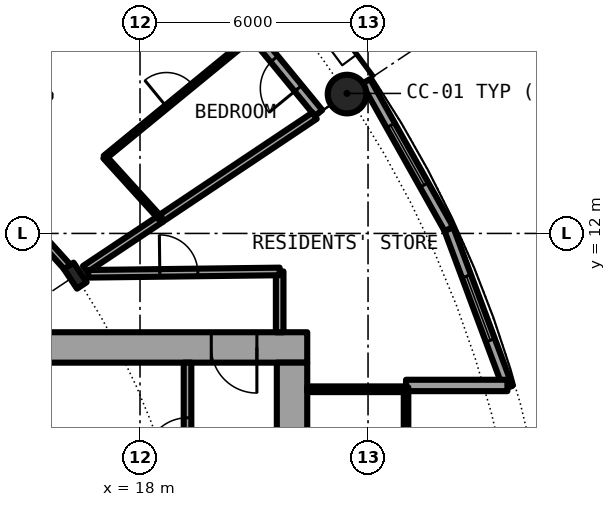
"""IFC4 building model, lengths in metres.
Left out: names, types, materials, properties, quantities, classifications, styles, units other than length and angle.
Written with IfcOpenShell. Run it as: python <this file> out.ifc"""

import sys

from ifc_helpers import new_model, si_unit, direction, frame, frame_2d, origin, origin_2d, place, context, subcontext, project, spatial, rectangle, hollow_circle, i_section, extrude, element, fill, save


model = new_model("IFC4")
c1 = context("Model", 3, precision=1e-05, world=origin(), true_north=direction((0.0, 1.0)))
c2 = subcontext(c1, "Body", "Model", "MODEL_VIEW")
j1 = project(units=[si_unit("LENGTHUNIT", "METRE"), si_unit("PLANEANGLEUNIT", "RADIAN")], contexts=[c1])
p1 = place(None, origin())
s1 = spatial("IfcSite", under=j1, at=p1, CompositionType="ELEMENT")
p2 = place(p1, origin())
s2 = spatial("IfcBuilding", under=s1, at=p2, CompositionType="ELEMENT")
p3 = place(p2, frame((0.0, 0.0, 31.95)))
s3 = spatial("IfcBuildingStorey", under=s2, at=p3, CompositionType="ELEMENT", Elevation=31.95)
p4 = place(p3, frame((23.448, 15.667, 0.0), z_axis=(0.0, 0.0, 1.0), x_axis=(1.0, 0.0, 0.0)))
e1 = element("IfcColumn", 1, at=p4, inside=s3, PredefinedType="COLUMN", context=c2, shape_type="SweptSolid", body=[
    extrude(hollow_circle(Radius=0.508, WallThickness=0.05, at=origin_2d()), origin(), (0.0, 0.0, 1.0), 3.05),
])
p5 = place(p3, frame((16.297, 10.889, 0.0), z_axis=(0.0, 0.0, 1.0), x_axis=(0.831469612303, 0.55557023302, 0.0)))
e2 = element("IfcColumn", 2, at=p5, inside=s3, PredefinedType="COLUMN", context=c2, shape_type="SweptSolid", body=[
    extrude(i_section(OverallWidth=0.305, OverallDepth=0.62, WebThickness=0.021, FlangeThickness=0.04, FilletRadius=0.027, at=origin_2d()), origin(), (0.0, 0.0, 1.0), 3.05),
])
p6 = place(p3, frame((22.699, 15.167, 0.0), z_axis=(0.0, 0.0, 1.0), x_axis=(-0.634382322723, 0.773019449054, 0.0)))
e3 = element("IfcWall", 3, at=p6, inside=s3, PredefinedType="SOLIDWALL", context=c2, shape_type="SweptSolid", body=[
    extrude(rectangle(XDim=5.352, YDim=0.25, at=frame_2d((2.676, 0.0))), origin(), (0.0, 0.0, 1.0), 2.7),
])
p7 = place(p6, frame((0.841, 0.0, 0.0)))
e4 = element("IfcOpeningElement", 4, at=p7, cuts=e3, PredefinedType="OPENING", context=c2, shape_type="SweptSolid", body=[
    extrude(rectangle(XDim=1.0, YDim=2.2, at=frame_2d((0.5, 1.1))), frame((0.0, 0.135, 0.0), z_axis=(0.0, -1.0, 0.0), x_axis=(1.0, 0.0, 0.0)), (0.0, 0.0, 1.0), 0.27),
])
p8 = place(p6, frame((3.111, 0.0, 0.3)))
e5 = element("IfcOpeningElement", 5, at=p8, cuts=e3, PredefinedType="OPENING", context=c2, shape_type="SweptSolid", body=[
    extrude(rectangle(XDim=1.8, YDim=2.1, at=frame_2d((0.9, 1.05))), frame((0.0, 0.135, 0.0), z_axis=(0.0, -1.0, 0.0), x_axis=(1.0, 0.0, 0.0)), (0.0, 0.0, 1.0), 0.27),
])
p9 = place(p3, frame((27.682, 7.945, 0.0), z_axis=(0.0, 0.0, 1.0), x_axis=(-0.349247811493, 0.937030397675, 0.0)))
e6 = element("IfcWall", 6, at=p9, inside=s3, PredefinedType="SOLIDWALL", context=c2, shape_type="SweptSolid", body=[
    extrude(rectangle(XDim=4.452, YDim=0.25, at=frame_2d((2.226, 0.0))), origin(), (0.0, 0.0, 1.0), 2.7),
])
p10 = place(p9, frame((1.327, 0.0, 0.3)))
e7 = element("IfcOpeningElement", 7, at=p10, cuts=e6, PredefinedType="OPENING", context=c2, shape_type="SweptSolid", body=[
    extrude(rectangle(XDim=1.8, YDim=2.1, at=frame_2d((0.9, 1.05))), frame((0.0, 0.135, 0.0), z_axis=(0.0, -1.0, 0.0), x_axis=(1.0, 0.0, 0.0)), (0.0, 0.0, 1.0), 0.27),
])
p11 = place(p3, frame((26.127, 12.117, 0.0), z_axis=(0.0, 0.0, 1.0), x_axis=(-0.489696356642, 0.871893042919, 0.0)))
e8 = element("IfcWall", 8, at=p11, inside=s3, PredefinedType="SOLIDWALL", context=c2, shape_type="SweptSolid", body=[
    extrude(rectangle(XDim=4.454, YDim=0.25, at=frame_2d((2.227, 0.0))), origin(), (0.0, 0.0, 1.0), 2.7),
])
p12 = place(p11, frame((1.327, 0.0, 0.3)))
e9 = element("IfcOpeningElement", 9, at=p12, cuts=e8, PredefinedType="OPENING", context=c2, shape_type="SweptSolid", body=[
    extrude(rectangle(XDim=1.8, YDim=2.1, at=frame_2d((0.9, 1.05))), frame((0.0, 0.135, 0.0), z_axis=(0.0, -1.0, 0.0), x_axis=(1.0, 0.0, 0.0)), (0.0, 0.0, 1.0), 0.27),
])
p13 = place(p3, frame((25.0, 8.0, 0.0), z_axis=(0.0, 0.0, 1.0), x_axis=(1.0, 0.0, 0.0)))
e10 = element("IfcWall", 10, at=p13, inside=s3, PredefinedType="SOLIDWALL", context=c2, shape_type="SweptSolid", body=[
    extrude(rectangle(XDim=2.667, YDim=0.3, at=frame_2d((1.333, 0.0))), origin(), (0.0, 0.0, 1.0), 2.7),
])
p14 = place(p3, frame((22.4, 9.0, 0.0), z_axis=(0.0, 0.0, 1.0), x_axis=(-1.0, 0.0, 0.0)))
e11 = element("IfcWall", 11, at=p14, inside=s3, PredefinedType="SHEAR", context=c2, shape_type="SweptSolid", body=[
    extrude(rectangle(XDim=14.2, YDim=0.8, at=frame_2d((7.1, 0.0))), origin(), (0.0, 0.0, 1.0), 3.05),
])
p15 = place(p14, frame((1.325, 0.0, 0.0)))
e12 = element("IfcOpeningElement", 12, at=p15, cuts=e11, PredefinedType="OPENING", context=c2, shape_type="SweptSolid", body=[
    extrude(rectangle(XDim=1.2, YDim=2.3, at=frame_2d((0.6, 1.15))), frame((0.0, 0.41, 0.0), z_axis=(0.0, -1.0, 0.0), x_axis=(1.0, 0.0, 0.0)), (0.0, 0.0, 1.0), 0.82),
])
p16 = place(p3, frame((22.0, 8.6, 0.0), z_axis=(0.0, 0.0, 1.0), x_axis=(0.0, -1.0, 0.0)))
e13 = element("IfcWall", 13, at=p16, inside=s3, PredefinedType="SHEAR", context=c2, shape_type="SweptSolid", body=[
    extrude(rectangle(XDim=17.2, YDim=0.8, at=frame_2d((8.6, 0.0))), origin(), (0.0, 0.0, 1.0), 3.05),
])
p17 = place(p16, frame((7.7, 0.0, 0.0)))
e14 = element("IfcOpeningElement", 14, at=p17, cuts=e13, PredefinedType="OPENING", context=c2, shape_type="SweptSolid", body=[
    extrude(rectangle(XDim=1.8, YDim=2.3, at=frame_2d((0.9, 1.15))), frame((0.0, 0.41, 0.0), z_axis=(0.0, -1.0, 0.0), x_axis=(1.0, 0.0, 0.0)), (0.0, 0.0, 1.0), 0.82),
])
p18 = place(p3, frame((19.25, 1.575, 0.0), z_axis=(0.0, 0.0, 1.0), x_axis=(0.0, 1.0, 0.0)))
e15 = element("IfcWall", 15, at=p18, inside=s3, PredefinedType="SOLIDWALL", context=c2, shape_type="SweptSolid", body=[
    extrude(rectangle(XDim=7.025, YDim=0.2, at=frame_2d((3.513, 0.0))), origin(), (0.0, 0.0, 1.0), 2.7),
])
p19 = place(p18, frame((4.475, 0.0, 0.0)))
e16 = element("IfcOpeningElement", 16, at=p19, cuts=e15, PredefinedType="OPENING", context=c2, shape_type="SweptSolid", body=[
    extrude(rectangle(XDim=1.1, YDim=2.3, at=frame_2d((0.55, 1.15))), frame((0.0, 0.11, 0.0), z_axis=(0.0, -1.0, 0.0), x_axis=(1.0, 0.0, 0.0)), (0.0, 0.0, 1.0), 0.22),
])
p20 = place(p3, frame((22.4, 7.9, 0.0), z_axis=(0.0, 0.0, 1.0), x_axis=(1.0, 0.0, 0.0)))
e17 = element("IfcWall", 17, at=p20, inside=s3, PredefinedType="PARTITIONING", context=c2, shape_type="SweptSolid", body=[
    extrude(rectangle(XDim=2.54, YDim=0.15, at=frame_2d((1.27, 0.0))), origin(), (0.0, 0.0, 1.0), 2.7),
])
p21 = place(p3, frame((25.0, -7.95, 0.0), z_axis=(0.0, 0.0, 1.0), x_axis=(0.0, 1.0, 0.0)))
e18 = element("IfcWall", 18, at=p21, inside=s3, PredefinedType="PARTITIONING", context=c2, shape_type="SweptSolid", body=[
    extrude(rectangle(XDim=15.9, YDim=0.12, at=frame_2d((7.95, 0.0))), origin(), (0.0, 0.0, 1.0), 2.7),
])
p22 = place(p21, frame((0.95, 0.0, 0.1)))
e19 = element("IfcOpeningElement", 19, at=p22, cuts=e18, PredefinedType="OPENING", context=c2, shape_type="SweptSolid", body=[
    extrude(rectangle(XDim=14.0, YDim=2.35, at=frame_2d((7.0, 1.175))), frame((0.0, 0.07, 0.0), z_axis=(0.0, -1.0, 0.0), x_axis=(1.0, 0.0, 0.0)), (0.0, 0.0, 1.0), 0.14),
])
p23 = place(p3, frame((21.675, 9.4, 0.0), z_axis=(0.0, 0.0, 1.0), x_axis=(0.0, 1.0, 0.0)))
e20 = element("IfcWall", 20, at=p23, inside=s3, PredefinedType="PARTITIONING", context=c2, shape_type="SweptSolid", body=[
    extrude(rectangle(XDim=1.6, YDim=0.2, at=frame_2d((0.8, 0.0))), origin(), (0.0, 0.0, 1.0), 2.7),
])
p24 = place(p3, frame((12.434, 15.151, 0.0), z_axis=(0.0, 0.0, 1.0), x_axis=(0.634381303318, 0.773020285633, 0.0)))
e21 = element("IfcWall", 21, at=p24, inside=s3, PredefinedType="PARTITIONING", context=c2, shape_type="SweptSolid", body=[
    extrude(rectangle(XDim=7.576, YDim=0.2, at=frame_2d((3.788, 0.0))), origin(), (0.0, 0.0, 1.0), 2.7),
])
p25 = place(p3, frame((17.077, 14.006, 0.0), z_axis=(0.0, 0.0, 1.0), x_axis=(0.77326214499, 0.634086472908, 0.0)))
e22 = element("IfcWall", 22, at=p25, inside=s3, PredefinedType="PARTITIONING", context=c2, shape_type="SweptSolid", body=[
    extrude(rectangle(XDim=5.089, YDim=0.1, at=frame_2d((2.544, 0.0))), origin(), (0.0, 0.0, 1.0), 2.7),
])
p26 = place(p25, frame((2.094, 0.0, 0.0)))
e23 = element("IfcOpeningElement", 23, at=p26, cuts=e22, PredefinedType="OPENING", context=c2, shape_type="SweptSolid", body=[
    extrude(rectangle(XDim=0.9, YDim=2.3, at=frame_2d((0.45, 1.15))), frame((0.0, 0.06, 0.0), z_axis=(0.0, -1.0, 0.0), x_axis=(1.0, 0.0, 0.0)), (0.0, 0.0, 1.0), 0.12),
])
p27 = place(p3, frame((18.542, 12.389, 0.0), z_axis=(0.0, 0.0, 1.0), x_axis=(0.831387096605, 0.55569370664, 0.0)))
e24 = element("IfcWall", 24, at=p27, inside=s3, PredefinedType="PARTITIONING", context=c2, shape_type="SweptSolid", body=[
    extrude(rectangle(XDim=4.875, YDim=0.2, at=frame_2d((2.438, 0.0))), origin(), (0.0, 0.0, 1.0), 2.7),
])
p28 = place(p3, frame((16.555, 11.061, 0.0), z_axis=(0.0, 0.0, 1.0), x_axis=(0.832066006555, 0.554676627176, 0.0)))
e25 = element("IfcWall", 25, at=p28, inside=s3, PredefinedType="PARTITIONING", context=c2, shape_type="SweptSolid", body=[
    extrude(rectangle(XDim=2.39, YDim=0.2, at=frame_2d((1.195, 0.0))), origin(), (0.0, 0.0, 1.0), 2.7),
])
p29 = place(p3, frame((16.637, 10.938, 0.0), z_axis=(0.0, 0.0, 1.0), x_axis=(0.99992425795, 0.012307654658, 0.0)))
e26 = element("IfcWall", 26, at=p29, inside=s3, PredefinedType="PARTITIONING", context=c2, shape_type="SweptSolid", body=[
    extrude(rectangle(XDim=5.039, YDim=0.2, at=frame_2d((2.519, 0.0))), origin(), (0.0, 0.0, 1.0), 2.7),
])
p30 = place(p29, frame((1.884, 0.0, 0.0)))
e27 = element("IfcOpeningElement", 27, at=p30, cuts=e26, PredefinedType="OPENING", context=c2, shape_type="SweptSolid", body=[
    extrude(rectangle(XDim=1.0, YDim=2.3, at=frame_2d((0.5, 1.15))), frame((0.0, 0.11, 0.0), z_axis=(0.0, -1.0, 0.0), x_axis=(1.0, 0.0, 0.0)), (0.0, 0.0, 1.0), 0.22),
])
p31 = place(p3, frame((12.434, 15.151, 0.0), z_axis=(0.0, 0.0, 1.0), x_axis=(0.671514934772, -0.740991020444, 0.0)))
e28 = element("IfcWall", 28, at=p31, inside=s3, PredefinedType="PARTITIONING", context=c2, shape_type="SweptSolid", body=[
    extrude(rectangle(XDim=5.598, YDim=0.2, at=frame_2d((2.799, 0.0))), origin(), (0.0, 0.0, 1.0), 2.38),
])
p32 = place(p31, frame((3.305, 0.0, 0.0)))
e29 = element("IfcOpeningElement", 29, at=p32, cuts=e28, PredefinedType="OPENING", context=c2, shape_type="SweptSolid", body=[
    extrude(rectangle(XDim=1.0, YDim=2.3, at=frame_2d((0.5, 1.15))), frame((0.0, 0.11, 0.0), z_axis=(0.0, -1.0, 0.0), x_axis=(1.0, 0.0, 0.0)), (0.0, 0.0, 1.0), 0.22),
])
p33 = place(p3, frame((17.072, 14.011, 0.0), z_axis=(0.0, 0.0, 1.0), x_axis=(0.67169789574, -0.740825172937, 0.0)))
e30 = element("IfcWall", 30, at=p33, inside=s3, PredefinedType="PARTITIONING", context=c2, shape_type="SweptSolid", body=[
    extrude(rectangle(XDim=2.183, YDim=0.1, at=frame_2d((1.091, 0.0))), origin(), (0.0, 0.0, 1.0), 2.7),
])
p34 = place(p7, origin())
e31 = element("IfcDoor", 31, at=p34, inside=s3, OperationType="SINGLE_SWING_LEFT", PredefinedType="DOOR", context=c2, shape_type="SweptSolid", body=[
    extrude(rectangle(XDim=1.0, YDim=2.2, at=frame_2d((0.5, 1.1))), frame((0.0, 0.025, 0.0), z_axis=(0.0, -1.0, 0.0), x_axis=(1.0, 0.0, 0.0)), (0.0, 0.0, 1.0), 0.05),
])
fill(e4, e31)
p35 = place(p10, origin())
e32 = element("IfcWindow", 32, at=p35, inside=s3, PartitioningType="SINGLE_PANEL", PredefinedType="WINDOW", context=c2, shape_type="SweptSolid", body=[
    extrude(rectangle(XDim=1.8, YDim=2.1, at=frame_2d((0.9, 1.05))), frame((0.0, 0.03, 0.0), z_axis=(0.0, -1.0, 0.0), x_axis=(1.0, 0.0, 0.0)), (0.0, 0.0, 1.0), 0.06),
])
fill(e7, e32)
p36 = place(p12, origin())
e33 = element("IfcWindow", 33, at=p36, inside=s3, PartitioningType="SINGLE_PANEL", PredefinedType="WINDOW", context=c2, shape_type="SweptSolid", body=[
    extrude(rectangle(XDim=1.8, YDim=2.1, at=frame_2d((0.9, 1.05))), frame((0.0, 0.03, 0.0), z_axis=(0.0, -1.0, 0.0), x_axis=(1.0, 0.0, 0.0)), (0.0, 0.0, 1.0), 0.06),
])
fill(e9, e33)
p37 = place(p19, origin())
e34 = element("IfcDoor", 34, at=p37, inside=s3, OperationType="SINGLE_SWING_LEFT", PredefinedType="DOOR", context=c2, shape_type="SweptSolid", body=[
    extrude(rectangle(XDim=1.1, YDim=2.3, at=frame_2d((0.55, 1.15))), frame((0.0, 0.025, 0.0), z_axis=(0.0, -1.0, 0.0), x_axis=(1.0, 0.0, 0.0)), (0.0, 0.0, 1.0), 0.05),
])
fill(e16, e34)
p38 = place(p15, origin())
e35 = element("IfcDoor", 35, at=p38, inside=s3, OperationType="SINGLE_SWING_RIGHT", PredefinedType="DOOR", context=c2, shape_type="SweptSolid", body=[
    extrude(rectangle(XDim=1.2, YDim=2.3, at=frame_2d((0.6, 1.15))), frame((0.0, 0.025, 0.0), z_axis=(0.0, -1.0, 0.0), x_axis=(1.0, 0.0, 0.0)), (0.0, 0.0, 1.0), 0.05),
])
fill(e12, e35)
p39 = place(p22, origin())
e36 = element("IfcWindow", 36, at=p39, inside=s3, PartitioningType="SINGLE_PANEL", PredefinedType="WINDOW", context=c2, shape_type="SweptSolid", body=[
    extrude(rectangle(XDim=14.0, YDim=2.35, at=frame_2d((7.0, 1.175))), frame((0.0, 0.03, 0.0), z_axis=(0.0, -1.0, 0.0), x_axis=(1.0, 0.0, 0.0)), (0.0, 0.0, 1.0), 0.06),
])
fill(e19, e36)
p40 = place(p26, origin())
e37 = element("IfcDoor", 37, at=p40, inside=s3, OperationType="SINGLE_SWING_RIGHT", PredefinedType="DOOR", context=c2, shape_type="SweptSolid", body=[
    extrude(rectangle(XDim=0.9, YDim=2.3, at=frame_2d((0.45, 1.15))), frame((0.0, 0.025, 0.0), z_axis=(0.0, -1.0, 0.0), x_axis=(1.0, 0.0, 0.0)), (0.0, 0.0, 1.0), 0.05),
])
fill(e23, e37)
p41 = place(p30, origin())
e38 = element("IfcDoor", 38, at=p41, inside=s3, OperationType="SINGLE_SWING_LEFT", PredefinedType="DOOR", context=c2, shape_type="SweptSolid", body=[
    extrude(rectangle(XDim=1.0, YDim=2.3, at=frame_2d((0.5, 1.15))), frame((0.0, 0.025, 0.0), z_axis=(0.0, -1.0, 0.0), x_axis=(1.0, 0.0, 0.0)), (0.0, 0.0, 1.0), 0.05),
])
fill(e27, e38)
save(model, sys.argv[1])
